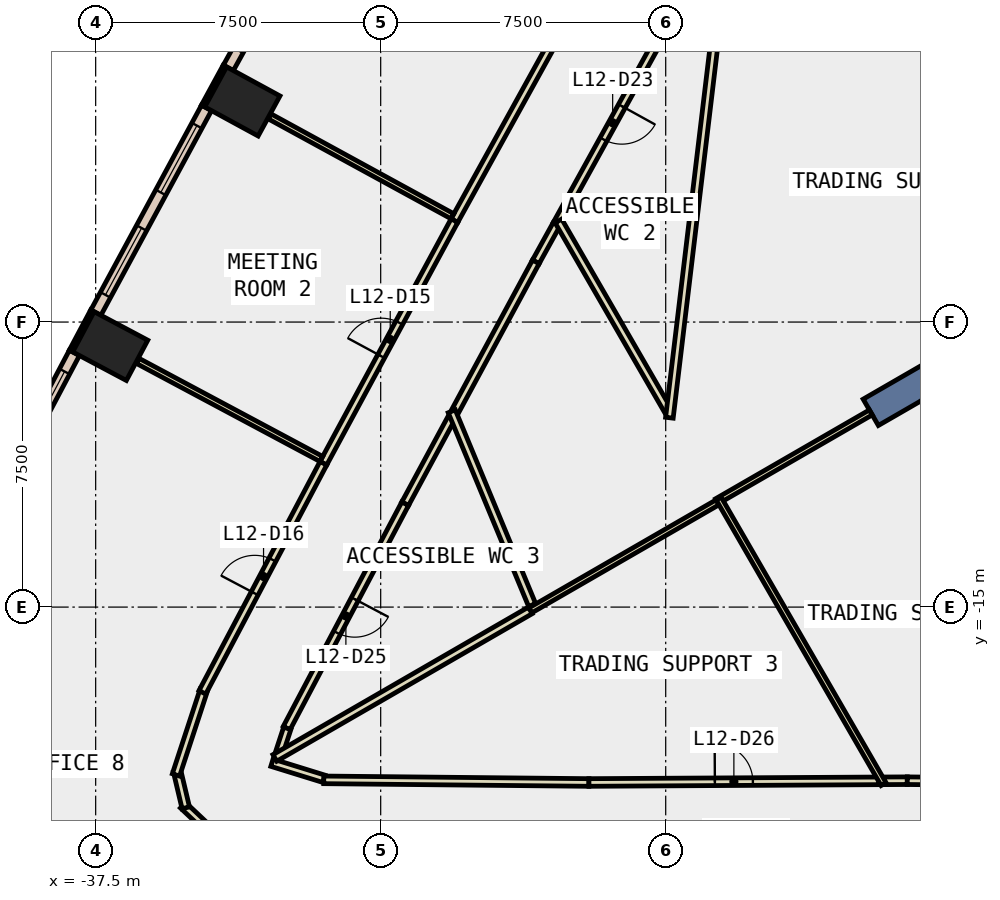
"""IFC4 building model, lengths in metres.
Left out: names, types, materials, properties, quantities, classifications, styles, units other than length and angle.
Written with IfcOpenShell. Run it as: python <this file> out.ifc"""

import sys

from ifc_helpers import new_model, si_unit, direction, frame, frame_2d, origin, origin_2d, place, context, subcontext, project, spatial, rectangle, extrude, element, fill, save


model = new_model("IFC4")
c1 = context("Model", 3, precision=1e-05, world=origin(), true_north=direction((0.0, 1.0)))
c2 = subcontext(c1, "Body", "Model", "MODEL_VIEW")
j1 = project(units=[si_unit("LENGTHUNIT", "METRE"), si_unit("PLANEANGLEUNIT", "RADIAN")], contexts=[c1])
p1 = place(None, origin())
s1 = spatial("IfcSite", under=j1, at=p1, CompositionType="ELEMENT")
p2 = place(p1, origin())
s2 = spatial("IfcBuilding", under=s1, at=p2, CompositionType="ELEMENT")
p3 = place(p2, frame((0.0, 0.0, 60.2)))
s3 = spatial("IfcBuildingStorey", under=s2, at=p3, CompositionType="ELEMENT", Elevation=60.2)
for number, where, z_axis, x_axis in (
    (1, (-33.64, -1.695, -0.4), (0.0, 0.0, 1.0), (0.478, 0.878, 0.0)),
    (2, (-37.117, -8.132, -0.4), (0.0, 0.0, 1.0), (0.469, 0.883, 0.0)),
):
    element("IfcColumn", number, at=place(p3, frame(where, z_axis=z_axis, x_axis=x_axis)), inside=s3, PredefinedType="COLUMN", context=c2, shape_type="SweptSolid", body=[
        extrude(rectangle(XDim=1.2, YDim=1.6, at=origin_2d()), origin(), (0.0, 0.0, 1.0), 4.2),
    ])
p4 = place(p3, frame((-9.31, -5.375, -0.4), z_axis=(0.0, 0.0, 1.0), x_axis=(-0.866017533419, -0.500013631625, 0.0)))
e3 = element("IfcWall", 3, at=p4, inside=s3, PredefinedType="SHEAR", context=c2, shape_type="SweptSolid", body=[
    extrude(rectangle(XDim=9.0, YDim=0.8, at=frame_2d((4.5, 0.0))), origin(), (0.0, 0.0, 1.0), 4.2),
])
p5 = place(p3, frame((-34.099, -0.762, 0.0), z_axis=(0.0, 0.0, 1.0), x_axis=(-0.478267644701, -0.878214131082, 0.0)))
e4 = element("IfcWall", 4, at=p5, inside=s3, PredefinedType="STANDARD", context=c2, shape_type="SweptSolid", body=[
    extrude(rectangle(XDim=1.2, YDim=0.1, at=frame_2d((0.6, 0.0))), origin(), (0.0, 0.0, 1.0), 3.8),
])
p6 = place(p3, frame((-37.586, -7.204, 0.0), z_axis=(0.0, 0.0, 1.0), x_axis=(-0.469467784567, -0.882949601763, 0.0)))
e5 = element("IfcWall", 5, at=p6, inside=s3, PredefinedType="STANDARD", context=c2, shape_type="SweptSolid", body=[
    extrude(rectangle(XDim=1.199, YDim=0.1, at=frame_2d((0.6, 0.0))), origin(), (0.0, 0.0, 1.0), 3.8),
])
p7 = place(p3, frame((-31.047, 4.549, 0.0), z_axis=(0.0, 0.0, 1.0), x_axis=(-0.483587271547, -0.875296150339, 0.0)))
e6 = element("IfcWall", 6, at=p7, inside=s3, PredefinedType="STANDARD", context=c2, shape_type="SweptSolid", body=[
    extrude(rectangle(XDim=6.125, YDim=0.3, at=frame_2d((3.062, 0.0))), origin(), (0.0, 0.0, 1.0), 3.8),
])
p8 = place(p7, frame((0.531, 0.0, 0.9)))
e7 = element("IfcOpeningElement", 7, at=p8, cuts=e6, PredefinedType="OPENING", context=c2, shape_type="SweptSolid", body=[
    extrude(rectangle(XDim=2.0, YDim=2.6, at=frame_2d((1.0, 1.3))), frame((0.0, 0.16, 0.0), z_axis=(0.0, -1.0, 0.0), x_axis=(1.0, 0.0, 0.0)), (0.0, 0.0, 1.0), 0.32),
])
p9 = place(p7, frame((3.594, 0.0, 0.9)))
e8 = element("IfcOpeningElement", 8, at=p9, cuts=e6, PredefinedType="OPENING", context=c2, shape_type="SweptSolid", body=[
    extrude(rectangle(XDim=2.0, YDim=2.6, at=frame_2d((1.0, 1.3))), frame((0.0, 0.16, 0.0), z_axis=(0.0, -1.0, 0.0), x_axis=(1.0, 0.0, 0.0)), (0.0, 0.0, 1.0), 0.32),
])
p10 = place(p3, frame((-34.583, -1.864, 0.0), z_axis=(0.0, 0.0, 1.0), x_axis=(-0.475413659872, -0.879762383833, 0.0)))
e9 = element("IfcWall", 9, at=p10, inside=s3, PredefinedType="STANDARD", context=c2, shape_type="SweptSolid", body=[
    extrude(rectangle(XDim=6.125, YDim=0.3, at=frame_2d((3.063, 0.0))), origin(), (0.0, 0.0, 1.0), 3.8),
])
p11 = place(p10, frame((0.531, 0.0, 0.9)))
e10 = element("IfcOpeningElement", 10, at=p11, cuts=e9, PredefinedType="OPENING", context=c2, shape_type="SweptSolid", body=[
    extrude(rectangle(XDim=2.0, YDim=2.6, at=frame_2d((1.0, 1.3))), frame((0.0, 0.16, 0.0), z_axis=(0.0, -1.0, 0.0), x_axis=(1.0, 0.0, 0.0)), (0.0, 0.0, 1.0), 0.32),
])
p12 = place(p10, frame((3.594, 0.0, 0.9)))
e11 = element("IfcOpeningElement", 11, at=p12, cuts=e9, PredefinedType="OPENING", context=c2, shape_type="SweptSolid", body=[
    extrude(rectangle(XDim=2.0, YDim=2.6, at=frame_2d((1.0, 1.3))), frame((0.0, 0.16, 0.0), z_axis=(0.0, -1.0, 0.0), x_axis=(1.0, 0.0, 0.0)), (0.0, 0.0, 1.0), 0.32),
])
p13 = place(p3, frame((-38.059, -8.31, 0.0), z_axis=(0.0, 0.0, 1.0), x_axis=(-0.467041710902, -0.884235285587, 0.0)))
e12 = element("IfcWall", 12, at=p13, inside=s3, PredefinedType="STANDARD", context=c2, shape_type="SweptSolid", body=[
    extrude(rectangle(XDim=6.22, YDim=0.3, at=frame_2d((3.11, 0.0))), origin(), (0.0, 0.0, 1.0), 3.8),
])
p14 = place(p13, frame((0.555, 0.0, 0.9)))
e13 = element("IfcOpeningElement", 13, at=p14, cuts=e12, PredefinedType="OPENING", context=c2, shape_type="SweptSolid", body=[
    extrude(rectangle(XDim=2.0, YDim=2.6, at=frame_2d((1.0, 1.3))), frame((0.0, 0.16, 0.0), z_axis=(0.0, -1.0, 0.0), x_axis=(1.0, 0.0, 0.0)), (0.0, 0.0, 1.0), 0.32),
])
p15 = place(p13, frame((3.665, 0.0, 0.9)))
e14 = element("IfcOpeningElement", 14, at=p15, cuts=e12, PredefinedType="OPENING", context=c2, shape_type="SweptSolid", body=[
    extrude(rectangle(XDim=2.0, YDim=2.6, at=frame_2d((1.0, 1.3))), frame((0.0, 0.16, 0.0), z_axis=(0.0, -1.0, 0.0), x_axis=(1.0, 0.0, 0.0)), (0.0, 0.0, 1.0), 0.32),
])
p16 = place(p3, frame((-25.371, -4.927, 0.0), z_axis=(0.0, 0.0, 1.0), x_axis=(-0.483899488004, -0.875123582993, 0.0)))
e15 = element("IfcWall", 15, at=p16, inside=s3, PredefinedType="PARTITIONING", context=c2, shape_type="SweptSolid", body=[
    extrude(rectangle(XDim=1.13, YDim=0.2, at=frame_2d((0.565, 0.0))), origin(), (0.0, 0.0, 1.0), 3.8),
])
p17 = place(p3, frame((-25.918, -5.916, 0.0), z_axis=(0.0, 0.0, 1.0), x_axis=(-0.4752384902, -0.879857021016, 0.0)))
e16 = element("IfcWall", 16, at=p17, inside=s3, PredefinedType="PARTITIONING", context=c2, shape_type="SweptSolid", body=[
    extrude(rectangle(XDim=4.473, YDim=0.2, at=frame_2d((2.237, 0.0))), origin(), (0.0, 0.0, 1.0), 3.8),
])
p18 = place(p3, frame((-22.42, 0.415, 0.0), z_axis=(0.0, 0.0, 1.0), x_axis=(-0.483559496818, -0.875311494861, 0.0)))
e17 = element("IfcWall", 17, at=p18, inside=s3, PredefinedType="PARTITIONING", context=c2, shape_type="SweptSolid", body=[
    extrude(rectangle(XDim=6.103, YDim=0.2, at=frame_2d((3.052, 0.0))), origin(), (0.0, 0.0, 1.0), 3.8),
])
p19 = place(p18, frame((2.552, 0.0, 0.0)))
e18 = element("IfcOpeningElement", 18, at=p19, cuts=e17, PredefinedType="OPENING", context=c2, shape_type="SweptSolid", body=[
    extrude(rectangle(XDim=1.0, YDim=2.1, at=frame_2d((0.5, 1.05))), frame((0.0, 0.11, 0.0), z_axis=(0.0, -1.0, 0.0), x_axis=(1.0, 0.0, 0.0)), (0.0, 0.0, 1.0), 0.22),
])
p20 = place(p3, frame((-16.742, -19.571, 0.0), z_axis=(0.0, 0.0, 1.0), x_axis=(0.999988034534, 0.004891910483, 0.0)))
e19 = element("IfcWall", 19, at=p20, inside=s3, PredefinedType="PARTITIONING", context=c2, shape_type="SweptSolid", body=[
    extrude(rectangle(XDim=0.599, YDim=0.2, at=frame_2d((0.299, 0.0))), origin(), (0.0, 0.0, 1.0), 3.8),
])
p21 = place(p3, frame((-16.143, -19.568, 0.0), z_axis=(0.0, 0.0, 1.0), x_axis=(0.999938688645, -0.011073344206, 0.0)))
e20 = element("IfcWall", 20, at=p21, inside=s3, PredefinedType="PARTITIONING", context=c2, shape_type="SweptSolid", body=[
    extrude(rectangle(XDim=6.218, YDim=0.2, at=frame_2d((3.109, 0.0))), origin(), (0.0, 0.0, 1.0), 3.8),
])
p22 = place(p21, frame((2.609, 0.0, 0.0)))
e21 = element("IfcOpeningElement", 21, at=p22, cuts=e20, PredefinedType="OPENING", context=c2, shape_type="SweptSolid", body=[
    extrude(rectangle(XDim=1.0, YDim=2.1, at=frame_2d((0.5, 1.05))), frame((0.0, 0.11, 0.0), z_axis=(0.0, -1.0, 0.0), x_axis=(1.0, 0.0, 0.0)), (0.0, 0.0, 1.0), 0.22),
])
p23 = place(p3, frame((-28.139, -10.028, 0.0), z_axis=(0.0, 0.0, 1.0), x_axis=(-0.475287687013, -0.879830446491, 0.0)))
e22 = element("IfcWall", 22, at=p23, inside=s3, PredefinedType="PARTITIONING", context=c2, shape_type="SweptSolid", body=[
    extrude(rectangle(XDim=2.561, YDim=0.2, at=frame_2d((1.28, 0.0))), origin(), (0.0, 0.0, 1.0), 3.8),
])
p24 = place(p3, frame((-29.356, -12.281, 0.0), z_axis=(0.0, 0.0, 1.0), x_axis=(-0.467123190417, -0.884192244353, 0.0)))
e23 = element("IfcWall", 23, at=p24, inside=s3, PredefinedType="PARTITIONING", context=c2, shape_type="SweptSolid", body=[
    extrude(rectangle(XDim=6.677, YDim=0.2, at=frame_2d((3.339, 0.0))), origin(), (0.0, 0.0, 1.0), 3.8),
])
p25 = place(p24, frame((2.839, 0.0, 0.0)))
e24 = element("IfcOpeningElement", 24, at=p25, cuts=e23, PredefinedType="OPENING", context=c2, shape_type="SweptSolid", body=[
    extrude(rectangle(XDim=1.0, YDim=2.1, at=frame_2d((0.5, 1.05))), frame((0.0, 0.11, 0.0), z_axis=(0.0, -1.0, 0.0), x_axis=(1.0, 0.0, 0.0)), (0.0, 0.0, 1.0), 0.22),
])
p26 = place(p3, frame((-32.459, -18.191, 0.0), z_axis=(0.0, 0.0, 1.0), x_axis=(-0.312158013001, -0.950030196846, 0.0)))
e25 = element("IfcWall", 25, at=p26, inside=s3, PredefinedType="PARTITIONING", context=c2, shape_type="SweptSolid", body=[
    extrude(rectangle(XDim=0.666, YDim=0.2, at=frame_2d((0.333, 0.0))), origin(), (0.0, 0.0, 1.0), 3.8),
])
p27 = place(p3, frame((-32.861, -19.095, 0.0), z_axis=(0.0, 0.0, 1.0), x_axis=(0.955301951006, -0.29563183591, 0.0)))
e26 = element("IfcWall", 26, at=p27, inside=s3, PredefinedType="PARTITIONING", context=c2, shape_type="SweptSolid", body=[
    extrude(rectangle(XDim=1.431, YDim=0.2, at=frame_2d((0.716, 0.0))), origin(), (0.0, 0.0, 1.0), 3.8),
])
p28 = place(p3, frame((-31.498, -19.546, 0.0), z_axis=(0.0, 0.0, 1.0), x_axis=(0.999950985372, -0.009900851195, 0.0)))
e27 = element("IfcWall", 27, at=p28, inside=s3, PredefinedType="PARTITIONING", context=c2, shape_type="SweptSolid", body=[
    extrude(rectangle(XDim=6.978, YDim=0.2, at=frame_2d((3.489, 0.0))), origin(), (0.0, 0.0, 1.0), 3.8),
])
p29 = place(p3, frame((-24.52, -19.615, 0.0), z_axis=(0.0, 0.0, 1.0), x_axis=(0.999984134574, 0.00563299218, 0.0)))
e28 = element("IfcWall", 28, at=p29, inside=s3, PredefinedType="PARTITIONING", context=c2, shape_type="SweptSolid", body=[
    extrude(rectangle(XDim=7.628, YDim=0.2, at=frame_2d((3.814, 0.0))), origin(), (0.0, 0.0, 1.0), 3.8),
])
p30 = place(p29, frame((3.314, 0.0, 0.0)))
e29 = element("IfcOpeningElement", 29, at=p30, cuts=e28, PredefinedType="OPENING", context=c2, shape_type="SweptSolid", body=[
    extrude(rectangle(XDim=1.0, YDim=2.1, at=frame_2d((0.5, 1.05))), frame((0.0, 0.11, 0.0), z_axis=(0.0, -1.0, 0.0), x_axis=(1.0, 0.0, 0.0)), (0.0, 0.0, 1.0), 0.22),
])
p31 = place(p3, frame((-28.06, -4.831, 0.0), z_axis=(0.0, 0.0, 1.0), x_axis=(0.483631054848, 0.875271959328, 0.0)))
e30 = element("IfcWall", 30, at=p31, inside=s3, PredefinedType="PARTITIONING", context=c2, shape_type="SweptSolid", body=[
    extrude(rectangle(XDim=7.33, YDim=0.2, at=frame_2d((3.665, 0.0))), origin(), (0.0, 0.0, 1.0), 3.8),
])
p32 = place(p3, frame((-31.509, -11.216, 0.0), z_axis=(0.0, 0.0, 1.0), x_axis=(0.475367159168, 0.879787510701, 0.0)))
e31 = element("IfcWall", 31, at=p32, inside=s3, PredefinedType="PARTITIONING", context=c2, shape_type="SweptSolid", body=[
    extrude(rectangle(XDim=7.257, YDim=0.2, at=frame_2d((3.629, 0.0))), origin(), (0.0, 0.0, 1.0), 3.8),
])
p33 = place(p32, frame((3.203, 0.0, 0.0)))
e32 = element("IfcOpeningElement", 32, at=p33, cuts=e31, PredefinedType="OPENING", context=c2, shape_type="SweptSolid", body=[
    extrude(rectangle(XDim=1.0, YDim=2.1, at=frame_2d((0.5, 1.05))), frame((0.0, 0.11, 0.0), z_axis=(0.0, -1.0, 0.0), x_axis=(1.0, 0.0, 0.0)), (0.0, 0.0, 1.0), 0.22),
])
p34 = place(p3, frame((-34.146, -21.209, 0.0), z_axis=(0.0, 0.0, 1.0), x_axis=(-0.727092478665, 0.686539530885, 0.0)))
e33 = element("IfcWall", 33, at=p34, inside=s3, PredefinedType="PARTITIONING", context=c2, shape_type="SweptSolid", body=[
    extrude(rectangle(XDim=1.451, YDim=0.2, at=frame_2d((0.726, 0.0))), origin(), (0.0, 0.0, 1.0), 3.8),
])
p35 = place(p3, frame((-35.129, -20.281, 0.0), z_axis=(0.0, 0.0, 1.0), x_axis=(-0.230392306785, 0.973097829087, 0.0)))
e34 = element("IfcWall", 34, at=p35, inside=s3, PredefinedType="PARTITIONING", context=c2, shape_type="SweptSolid", body=[
    extrude(rectangle(XDim=0.986, YDim=0.2, at=frame_2d((0.493, 0.0))), origin(), (0.0, 0.0, 1.0), 3.8),
])
p36 = place(p3, frame((-35.387, -19.416, 0.0), z_axis=(0.0, 0.0, 1.0), x_axis=(0.31172635658, 0.950171920556, 0.0)))
e35 = element("IfcWall", 35, at=p36, inside=s3, PredefinedType="PARTITIONING", context=c2, shape_type="SweptSolid", body=[
    extrude(rectangle(XDim=2.345, YDim=0.2, at=frame_2d((1.172, 0.0))), origin(), (0.0, 0.0, 1.0), 3.8),
])
p37 = place(p3, frame((-34.692, -17.243, 0.0), z_axis=(0.0, 0.0, 1.0), x_axis=(0.467102540817, 0.884203153332, 0.0)))
e36 = element("IfcWall", 36, at=p37, inside=s3, PredefinedType="PARTITIONING", context=c2, shape_type="SweptSolid", body=[
    extrude(rectangle(XDim=6.816, YDim=0.2, at=frame_2d((3.408, 0.0))), origin(), (0.0, 0.0, 1.0), 3.8),
])
p38 = place(p37, frame((2.946, 0.0, 0.0)))
e37 = element("IfcOpeningElement", 37, at=p38, cuts=e36, PredefinedType="OPENING", context=c2, shape_type="SweptSolid", body=[
    extrude(rectangle(XDim=1.0, YDim=2.1, at=frame_2d((0.5, 1.05))), frame((0.0, 0.11, 0.0), z_axis=(0.0, -1.0, 0.0), x_axis=(1.0, 0.0, 0.0)), (0.0, 0.0, 1.0), 0.22),
])
p39 = place(p3, frame((-25.323, -4.84, 0.0), z_axis=(0.0, 0.0, 1.0), x_axis=(0.500070797646, -0.865984524886, 0.0)))
e38 = element("IfcWall", 38, at=p39, inside=s3, PredefinedType="PARTITIONING", context=c2, shape_type="SweptSolid", body=[
    extrude(rectangle(XDim=5.763, YDim=0.2, at=frame_2d((2.882, 0.0))), origin(), (0.0, 0.0, 1.0), 3.8),
])
p40 = place(p3, frame((-22.403, -10.017, 0.0), z_axis=(0.0, 0.0, 1.0), x_axis=(0.119143334217, 0.992877064853, 0.0)))
e39 = element("IfcWall", 39, at=p40, inside=s3, PredefinedType="PARTITIONING", context=c2, shape_type="SweptSolid", body=[
    extrude(rectangle(XDim=10.207, YDim=0.2, at=frame_2d((5.104, 0.0))), origin(), (0.0, 0.0, 1.0), 3.8),
])
p41 = place(p3, frame((-17.103, -9.878, 0.0), z_axis=(0.0, 0.0, 1.0), x_axis=(-0.866013358989, -0.500020861617, 0.0)))
e40 = element("IfcWall", 40, at=p41, inside=s3, PredefinedType="PARTITIONING", context=c2, shape_type="SweptSolid", body=[
    extrude(rectangle(XDim=4.674, YDim=0.15, at=frame_2d((2.337, 0.0))), origin(), (0.0, 0.0, 1.0), 3.8),
])
p42 = place(p3, frame((-26.015, -14.946, 0.0), z_axis=(0.0, 0.0, 1.0), x_axis=(-0.383189005855, 0.923669955012, 0.0)))
e41 = element("IfcWall", 41, at=p42, inside=s3, PredefinedType="PARTITIONING", context=c2, shape_type="SweptSolid", body=[
    extrude(rectangle(XDim=5.52, YDim=0.2, at=frame_2d((2.76, 0.0))), origin(), (0.0, 0.0, 1.0), 3.8),
])
p43 = place(p3, frame((-21.135, -12.243, 0.0), z_axis=(0.0, 0.0, 1.0), x_axis=(-0.866083439347, -0.499899465982, 0.0)))
e42 = element("IfcWall", 42, at=p43, inside=s3, PredefinedType="PARTITIONING", context=c2, shape_type="SweptSolid", body=[
    extrude(rectangle(XDim=5.691, YDim=0.15, at=frame_2d((2.846, 0.0))), origin(), (0.0, 0.0, 1.0), 3.8),
])
p44 = place(p3, frame((-16.767, -19.658, 0.0), z_axis=(0.0, 0.0, 1.0), x_axis=(-0.500083586486, 0.865977139726, 0.0)))
e43 = element("IfcWall", 43, at=p44, inside=s3, PredefinedType="PARTITIONING", context=c2, shape_type="SweptSolid", body=[
    extrude(rectangle(XDim=8.68, YDim=0.15, at=frame_2d((4.34, 0.0))), origin(), (0.0, 0.0, 1.0), 3.8),
])
p45 = place(p3, frame((-26.064, -15.088, 0.0), z_axis=(0.0, 0.0, 1.0), x_axis=(-0.865982841629, -0.500073712571, 0.0)))
e44 = element("IfcWall", 44, at=p45, inside=s3, PredefinedType="PARTITIONING", context=c2, shape_type="SweptSolid", body=[
    extrude(rectangle(XDim=7.761, YDim=0.2, at=frame_2d((3.88, 0.0))), origin(), (0.0, 0.0, 1.0), 3.8),
])
p46 = place(p3, frame((-28.111, -4.717, 0.0), z_axis=(0.0, 0.0, 1.0), x_axis=(-0.877558297547, 0.479469951515, 0.0)))
e45 = element("IfcWall", 45, at=p46, inside=s3, PredefinedType="PARTITIONING", context=c2, shape_type="SweptSolid", body=[
    extrude(rectangle(XDim=5.481, YDim=0.15, at=frame_2d((2.74, 0.0))), origin(), (0.0, 0.0, 1.0), 3.8),
])
p47 = place(p3, frame((-31.561, -11.103, 0.0), z_axis=(0.0, 0.0, 1.0), x_axis=(-0.882056805494, 0.47114306944, 0.0)))
e46 = element("IfcWall", 46, at=p47, inside=s3, PredefinedType="PARTITIONING", context=c2, shape_type="SweptSolid", body=[
    extrude(rectangle(XDim=5.48, YDim=0.15, at=frame_2d((2.74, 0.0))), origin(), (0.0, 0.0, 1.0), 3.8),
])
p48 = place(p11, origin())
e47 = element("IfcWindow", 47, at=p48, inside=s3, PartitioningType="SINGLE_PANEL", PredefinedType="WINDOW", context=c2, shape_type="SweptSolid", body=[
    extrude(rectangle(XDim=2.0, YDim=2.6, at=frame_2d((1.0, 1.3))), frame((0.0, 0.03, 0.0), z_axis=(0.0, -1.0, 0.0), x_axis=(1.0, 0.0, 0.0)), (0.0, 0.0, 1.0), 0.06),
])
fill(e10, e47)
p49 = place(p12, origin())
e48 = element("IfcWindow", 48, at=p49, inside=s3, PartitioningType="SINGLE_PANEL", PredefinedType="WINDOW", context=c2, shape_type="SweptSolid", body=[
    extrude(rectangle(XDim=2.0, YDim=2.6, at=frame_2d((1.0, 1.3))), frame((0.0, 0.03, 0.0), z_axis=(0.0, -1.0, 0.0), x_axis=(1.0, 0.0, 0.0)), (0.0, 0.0, 1.0), 0.06),
])
fill(e11, e48)
p50 = place(p14, origin())
e49 = element("IfcWindow", 49, at=p50, inside=s3, PartitioningType="SINGLE_PANEL", PredefinedType="WINDOW", context=c2, shape_type="SweptSolid", body=[
    extrude(rectangle(XDim=2.0, YDim=2.6, at=frame_2d((1.0, 1.3))), frame((0.0, 0.03, 0.0), z_axis=(0.0, -1.0, 0.0), x_axis=(1.0, 0.0, 0.0)), (0.0, 0.0, 1.0), 0.06),
])
fill(e13, e49)
p51 = place(p33, origin())
e50 = element("IfcDoor", 50, at=p51, inside=s3, OperationType="SINGLE_SWING_RIGHT", PredefinedType="DOOR", context=c2, shape_type="SweptSolid", body=[
    extrude(rectangle(XDim=1.0, YDim=2.1, at=frame_2d((0.5, 1.05))), frame((0.0, 0.025, 0.0), z_axis=(0.0, -1.0, 0.0), x_axis=(1.0, 0.0, 0.0)), (0.0, 0.0, 1.0), 0.05),
])
fill(e32, e50)
p52 = place(p38, origin())
e51 = element("IfcDoor", 51, at=p52, inside=s3, OperationType="SINGLE_SWING_LEFT", PredefinedType="DOOR", context=c2, shape_type="SweptSolid", body=[
    extrude(rectangle(XDim=1.0, YDim=2.1, at=frame_2d((0.5, 1.05))), frame((0.0, 0.025, 0.0), z_axis=(0.0, -1.0, 0.0), x_axis=(1.0, 0.0, 0.0)), (0.0, 0.0, 1.0), 0.05),
])
fill(e37, e51)
p53 = place(p19, origin())
e52 = element("IfcDoor", 52, at=p53, inside=s3, OperationType="SINGLE_SWING_LEFT", PredefinedType="DOOR", context=c2, shape_type="SweptSolid", body=[
    extrude(rectangle(XDim=1.0, YDim=2.1, at=frame_2d((0.5, 1.05))), frame((0.0, 0.025, 0.0), z_axis=(0.0, -1.0, 0.0), x_axis=(1.0, 0.0, 0.0)), (0.0, 0.0, 1.0), 0.05),
])
fill(e18, e52)
p54 = place(p25, origin())
e53 = element("IfcDoor", 53, at=p54, inside=s3, OperationType="SINGLE_SWING_LEFT", PredefinedType="DOOR", context=c2, shape_type="SweptSolid", body=[
    extrude(rectangle(XDim=1.0, YDim=2.1, at=frame_2d((0.5, 1.05))), frame((0.0, 0.025, 0.0), z_axis=(0.0, -1.0, 0.0), x_axis=(1.0, 0.0, 0.0)), (0.0, 0.0, 1.0), 0.05),
])
fill(e24, e53)
p55 = place(p30, origin())
e54 = element("IfcDoor", 54, at=p55, inside=s3, OperationType="SINGLE_SWING_LEFT", PredefinedType="DOOR", context=c2, shape_type="SweptSolid", body=[
    extrude(rectangle(XDim=1.0, YDim=2.1, at=frame_2d((0.5, 1.05))), frame((0.0, 0.025, 0.0), z_axis=(0.0, -1.0, 0.0), x_axis=(1.0, 0.0, 0.0)), (0.0, 0.0, 1.0), 0.05),
])
fill(e29, e54)
save(model, sys.argv[1])
